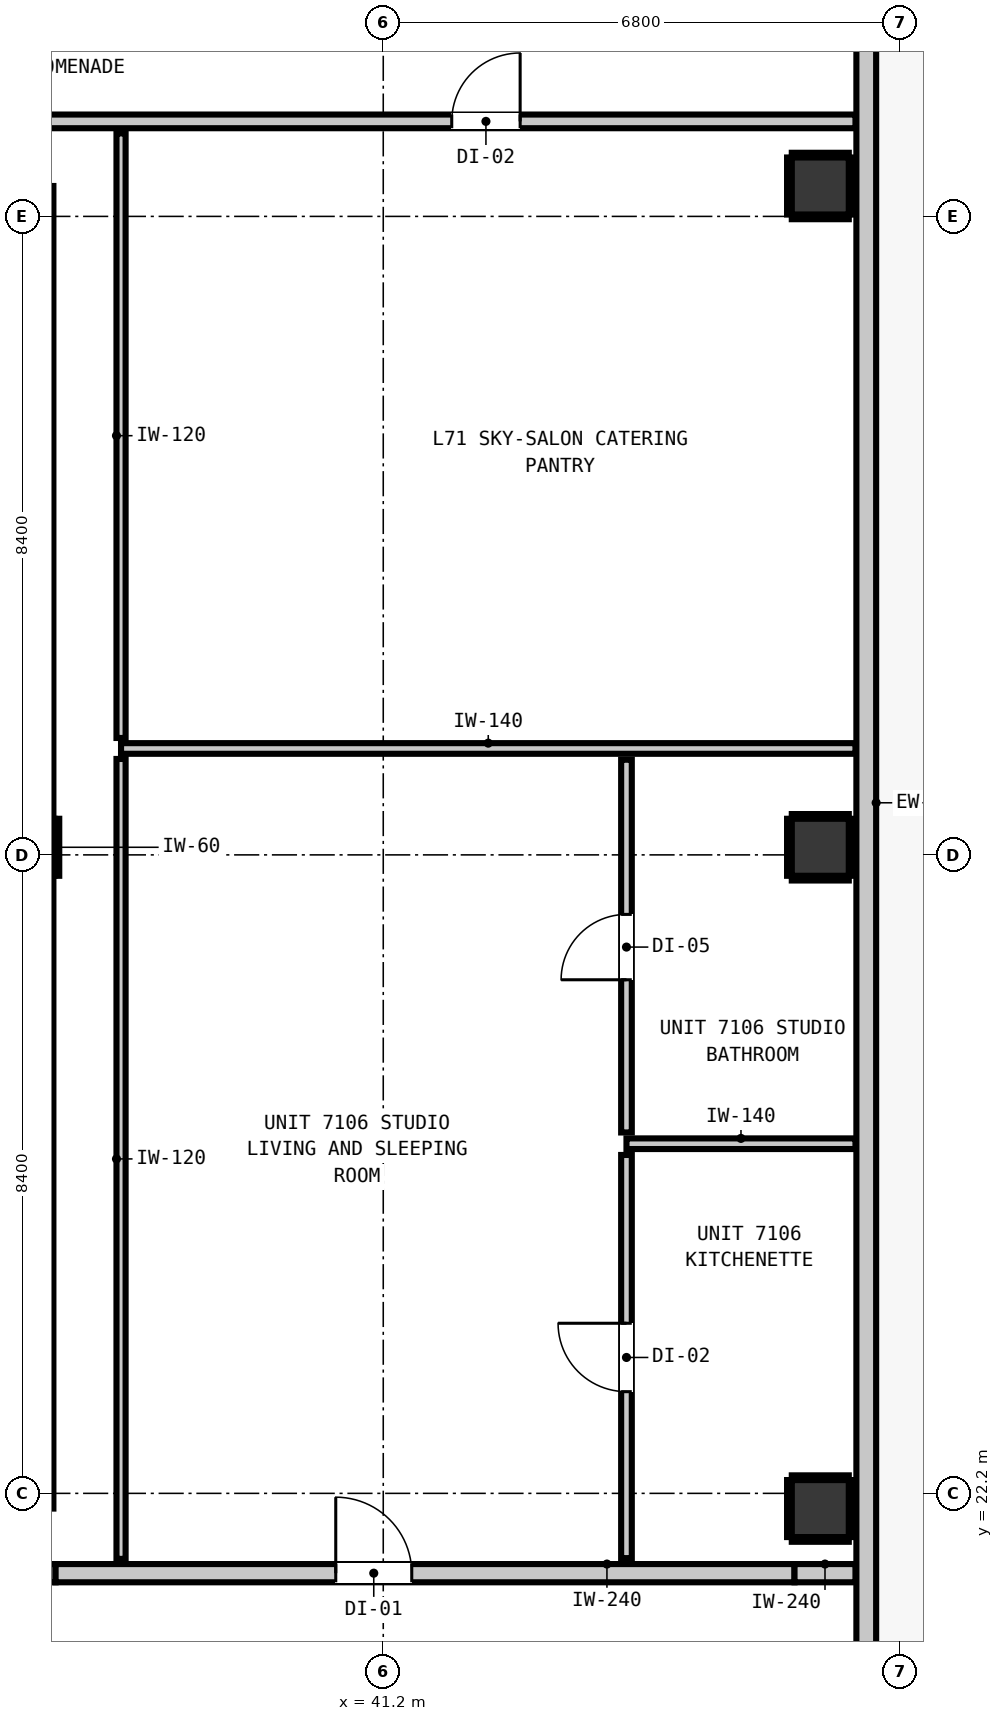
"""IFC4 building model, lengths in metres.
Left out: names, types, materials, properties, quantities, classifications, styles, units other than length and angle.
Written with IfcOpenShell. Run it as: python <this file> out.ifc"""

import sys

from ifc_helpers import new_model, si_unit, direction, frame, frame_2d, origin, origin_2d, place, context, subcontext, project, spatial, rectangle, extrude, element, fill, save


model = new_model("IFC4")
c1 = context("Model", 3, precision=1e-05, world=origin(), true_north=direction((0.0, 1.0)))
c2 = subcontext(c1, "Body", "Model", "MODEL_VIEW")
j1 = project(units=[si_unit("LENGTHUNIT", "METRE"), si_unit("PLANEANGLEUNIT", "RADIAN")], contexts=[c1])
p1 = place(None, origin())
s1 = spatial("IfcSite", under=j1, at=p1, CompositionType="ELEMENT")
p2 = place(p1, origin())
s2 = spatial("IfcBuilding", under=s1, at=p2, CompositionType="ELEMENT")
p3 = place(p2, frame((0.0, 0.0, 244.56)))
s3 = spatial("IfcBuildingStorey", under=s2, at=p3, CompositionType="ELEMENT", Elevation=244.56)
p4 = place(p3, frame((36.5, 30.7, 0.0), z_axis=(0.0, 0.0, 1.0), x_axis=(1.0, 0.0, 0.0)))
e1 = element("IfcColumn", 1, at=p4, inside=s3, PredefinedType="COLUMN", context=c2, shape_type="SweptSolid", body=[
    extrude(rectangle(XDim=0.75, YDim=0.75, at=origin_2d()), origin(), (0.0, 0.0, 1.0), 3.32),
])
p5 = place(p3, frame((36.46, 22.0, 0.0), z_axis=(0.0, 0.0, 1.0), x_axis=(0.0, 1.0, 0.0)))
e2 = element("IfcWall", 2, at=p5, inside=s3, PredefinedType="SHEAR", context=c2, shape_type="SweptSolid", body=[
    extrude(rectangle(XDim=8.32, YDim=0.8, at=frame_2d((4.16, 0.0))), origin(), (0.0, 0.0, 1.0), 3.32),
])
p6 = place(p3, frame((36.46, 31.08, 0.0), z_axis=(0.0, 0.0, 1.0), x_axis=(0.0, 1.0, 0.0)))
e3 = element("IfcWall", 3, at=p6, inside=s3, PredefinedType="SHEAR", context=c2, shape_type="SweptSolid", body=[
    extrude(rectangle(XDim=8.32, YDim=0.8, at=frame_2d((4.16, 0.0))), origin(), (0.0, 0.0, 1.0), 3.32),
])
for number, where, z_axis, x_axis in (
    (4, (46.95, 22.0, 0.0), (0.0, 0.0, 1.0), (1.0, 0.0, 0.0)),
    (5, (46.95, 30.7, 0.0), (0.0, 0.0, 1.0), (1.0, 0.0, 0.0)),
    (6, (46.95, 39.4, 0.0), (0.0, 0.0, 1.0), (1.0, 0.0, 0.0)),
):
    element("IfcColumn", number, at=place(p3, frame(where, z_axis=z_axis, x_axis=x_axis)), inside=s3, PredefinedType="COLUMN", context=c2, shape_type="SweptSolid", body=[
        extrude(rectangle(XDim=0.75, YDim=0.75, at=origin_2d()), origin(), (0.0, 0.0, 1.0), 3.32),
    ])
p7 = place(p3, frame((47.555, 48.855, 0.0), z_axis=(0.0, 0.0, 1.0), x_axis=(0.0, -1.0, 0.0)))
e7 = element("IfcWall", 7, at=p7, inside=s3, PredefinedType="STANDARD", context=c2, shape_type="SweptSolid", body=[
    extrude(rectangle(XDim=30.31, YDim=0.26, at=frame_2d((15.155, 0.0))), origin(), (0.0, 0.0, 1.0), 3.1),
])
p8 = place(p7, frame((3.729, 0.0, 0.0)))
e8 = element("IfcOpeningElement", 8, at=p8, cuts=e7, PredefinedType="OPENING", context=c2, shape_type="SweptSolid", body=[
    extrude(rectangle(XDim=1.0, YDim=2.15, at=frame_2d((0.5, 1.075))), frame((0.0, 0.14, 0.0), z_axis=(0.0, -1.0, 0.0), x_axis=(1.0, 0.0, 0.0)), (0.0, 0.0, 1.0), 0.28),
])
p9 = place(p3, frame((10.787, 21.15, 0.0), z_axis=(0.0, 0.0, 1.0), x_axis=(1.0, 0.0, 0.0)))
e9 = element("IfcWall", 9, at=p9, inside=s3, PredefinedType="PARTITIONING", context=c2, shape_type="SweptSolid", body=[
    extrude(rectangle(XDim=26.102, YDim=0.24, at=frame_2d((13.051, 0.0))), origin(), (0.0, 0.0, 1.0), 3.1),
])
p10 = place(p9, frame((7.423, 0.0, 0.0)))
e10 = element("IfcOpeningElement", 10, at=p10, cuts=e9, PredefinedType="OPENING", context=c2, shape_type="SweptSolid", body=[
    extrude(rectangle(XDim=1.1, YDim=2.15, at=frame_2d((0.55, 1.075))), frame((0.0, 0.13, 0.0), z_axis=(0.0, -1.0, 0.0), x_axis=(1.0, 0.0, 0.0)), (0.0, 0.0, 1.0), 0.26),
])
p11 = place(p3, frame((36.889, 21.15, 0.0), z_axis=(0.0, 0.0, 1.0), x_axis=(1.0, 0.0, 0.0)))
e11 = element("IfcWall", 11, at=p11, inside=s3, PredefinedType="PARTITIONING", context=c2, shape_type="SweptSolid", body=[
    extrude(rectangle(XDim=9.722, YDim=0.24, at=frame_2d((4.861, 0.0))), origin(), (0.0, 0.0, 1.0), 2.477),
])
p12 = place(p11, frame((3.686, 0.0, 0.0)))
e12 = element("IfcOpeningElement", 12, at=p12, cuts=e11, PredefinedType="OPENING", context=c2, shape_type="SweptSolid", body=[
    extrude(rectangle(XDim=1.0, YDim=2.15, at=frame_2d((0.5, 1.075))), frame((0.0, 0.13, 0.0), z_axis=(0.0, -1.0, 0.0), x_axis=(1.0, 0.0, 0.0)), (0.0, 0.0, 1.0), 0.26),
])
p13 = place(p3, frame((46.611, 21.15, 0.0), z_axis=(0.0, 0.0, 1.0), x_axis=(1.0, 0.0, 0.0)))
e13 = element("IfcWall", 13, at=p13, inside=s3, PredefinedType="PARTITIONING", context=c2, shape_type="SweptSolid", body=[
    extrude(rectangle(XDim=0.802, YDim=0.24, at=frame_2d((0.401, 0.0))), origin(), (0.0, 0.0, 1.0), 3.1),
])
p14 = place(p3, frame((10.787, 40.25, 0.0), z_axis=(0.0, 0.0, 1.0), x_axis=(1.0, 0.0, 0.0)))
e14 = element("IfcWall", 14, at=p14, inside=s3, PredefinedType="PARTITIONING", context=c2, shape_type="SweptSolid", body=[
    extrude(rectangle(XDim=36.626, YDim=0.18, at=frame_2d((18.313, 0.0))), origin(), (0.0, 0.0, 1.0), 3.1),
])
p15 = place(p14, frame((6.648, 0.0, 0.0)))
e15 = element("IfcOpeningElement", 15, at=p15, cuts=e14, PredefinedType="OPENING", context=c2, shape_type="SweptSolid", body=[
    extrude(rectangle(XDim=1.4, YDim=2.15, at=frame_2d((0.7, 1.075))), frame((0.0, 0.1, 0.0), z_axis=(0.0, -1.0, 0.0), x_axis=(1.0, 0.0, 0.0)), (0.0, 0.0, 1.0), 0.2),
])
p16 = place(p14, frame((31.314, 0.0, 0.0)))
e16 = element("IfcOpeningElement", 16, at=p16, cuts=e14, PredefinedType="OPENING", context=c2, shape_type="SweptSolid", body=[
    extrude(rectangle(XDim=0.9, YDim=2.1, at=frame_2d((0.45, 1.05))), frame((0.0, 0.1, 0.0), z_axis=(0.0, -1.0, 0.0), x_axis=(1.0, 0.0, 0.0)), (0.0, 0.0, 1.0), 0.2),
])
p17 = place(p3, frame((44.4, 26.8, 0.0), z_axis=(0.0, 0.0, 1.0), x_axis=(1.0, 0.0, 0.0)))
e17 = element("IfcWall", 17, at=p17, inside=s3, PredefinedType="PARTITIONING", context=c2, shape_type="SweptSolid", body=[
    extrude(rectangle(XDim=3.013, YDim=0.14, at=frame_2d((1.507, 0.0))), origin(), (0.0, 0.0, 1.0), 3.1),
])
p18 = place(p3, frame((37.75, 32.0, 0.0), z_axis=(0.0, 0.0, 1.0), x_axis=(1.0, 0.0, 0.0)))
e18 = element("IfcWall", 18, at=p18, inside=s3, PredefinedType="PARTITIONING", context=c2, shape_type="SweptSolid", body=[
    extrude(rectangle(XDim=9.663, YDim=0.14, at=frame_2d((4.832, 0.0))), origin(), (0.0, 0.0, 1.0), 3.1),
])
p19 = place(p3, frame((44.4, 21.348, 0.0), z_axis=(0.0, 0.0, 1.0), x_axis=(0.0, 1.0, 0.0)))
e19 = element("IfcWall", 19, at=p19, inside=s3, PredefinedType="PARTITIONING", context=c2, shape_type="SweptSolid", body=[
    extrude(rectangle(XDim=5.304, YDim=0.14, at=frame_2d((2.652, 0.0))), origin(), (0.0, 0.0, 1.0), 3.1),
])
p20 = place(p19, frame((2.19, 0.0, 0.0)))
e20 = element("IfcOpeningElement", 20, at=p20, cuts=e19, PredefinedType="OPENING", context=c2, shape_type="SweptSolid", body=[
    extrude(rectangle(XDim=0.9, YDim=2.1, at=frame_2d((0.45, 1.05))), frame((0.0, 0.08, 0.0), z_axis=(0.0, -1.0, 0.0), x_axis=(1.0, 0.0, 0.0)), (0.0, 0.0, 1.0), 0.16),
])
p21 = place(p3, frame((44.4, 26.948, 0.0), z_axis=(0.0, 0.0, 1.0), x_axis=(0.0, 1.0, 0.0)))
e21 = element("IfcWall", 21, at=p21, inside=s3, PredefinedType="PARTITIONING", context=c2, shape_type="SweptSolid", body=[
    extrude(rectangle(XDim=4.904, YDim=0.14, at=frame_2d((2.452, 0.0))), origin(), (0.0, 0.0, 1.0), 3.1),
])
p22 = place(p21, frame((2.009, 0.0, 0.0)))
e22 = element("IfcOpeningElement", 22, at=p22, cuts=e21, PredefinedType="OPENING", context=c2, shape_type="SweptSolid", body=[
    extrude(rectangle(XDim=0.86, YDim=2.02, at=frame_2d((0.43, 1.01))), frame((0.0, 0.08, 0.0), z_axis=(0.0, -1.0, 0.0), x_axis=(1.0, 0.0, 0.0)), (0.0, 0.0, 1.0), 0.16),
])
p23 = place(p3, frame((37.75, 21.338, 0.0), z_axis=(0.0, 0.0, 1.0), x_axis=(0.0, 1.0, 0.0)))
e23 = element("IfcWall", 23, at=p23, inside=s3, PredefinedType="PARTITIONING", context=c2, shape_type="SweptSolid", body=[
    extrude(rectangle(XDim=10.524, YDim=0.12, at=frame_2d((5.262, 0.0))), origin(), (0.0, 0.0, 1.0), 3.1),
])
p24 = place(p3, frame((37.75, 32.138, 0.0), z_axis=(0.0, 0.0, 1.0), x_axis=(0.0, 1.0, 0.0)))
e24 = element("IfcWall", 24, at=p24, inside=s3, PredefinedType="PARTITIONING", context=c2, shape_type="SweptSolid", body=[
    extrude(rectangle(XDim=7.954, YDim=0.12, at=frame_2d((3.977, 0.0))), origin(), (0.0, 0.0, 1.0), 3.1),
])
for number, where, z_axis, x_axis in (
    (25, (36.907, 30.325, 0.0), (0.0, 0.0, 1.0), (0.0, 1.0, 0.0)),
    (26, (46.575, 21.593, 0.0), (0.0, 0.0, 1.0), (1.0, 0.0, 0.0)),
    (27, (46.575, 22.407, 0.0), (0.0, 0.0, 1.0), (1.0, 0.0, 0.0)),
    (28, (46.543, 21.625, 0.0), (0.0, 0.0, 1.0), (0.0, 1.0, 0.0)),
    (29, (47.357, 21.625, 0.0), (0.0, 0.0, 1.0), (0.0, 1.0, 0.0)),
    (30, (46.575, 30.293, 0.0), (0.0, 0.0, 1.0), (1.0, 0.0, 0.0)),
    (31, (46.575, 31.107, 0.0), (0.0, 0.0, 1.0), (1.0, 0.0, 0.0)),
    (32, (46.543, 30.325, 0.0), (0.0, 0.0, 1.0), (0.0, 1.0, 0.0)),
    (33, (47.357, 30.325, 0.0), (0.0, 0.0, 1.0), (0.0, 1.0, 0.0)),
    (34, (46.575, 38.993, 0.0), (0.0, 0.0, 1.0), (1.0, 0.0, 0.0)),
    (35, (46.575, 39.807, 0.0), (0.0, 0.0, 1.0), (1.0, 0.0, 0.0)),
    (36, (46.543, 39.025, 0.0), (0.0, 0.0, 1.0), (0.0, 1.0, 0.0)),
    (37, (47.357, 39.025, 0.0), (0.0, 0.0, 1.0), (0.0, 1.0, 0.0)),
):
    element("IfcWall", number, at=place(p3, frame(where, z_axis=z_axis, x_axis=x_axis)), inside=s3, PredefinedType="PARTITIONING", context=c2, shape_type="SweptSolid", body=[
        extrude(rectangle(XDim=0.75, YDim=0.06, at=frame_2d((0.375, 0.0))), origin(), (0.0, 0.0, 1.0), 1.45),
    ])
p25 = place(p12, origin())
e38 = element("IfcDoor", 38, at=p25, inside=s3, OperationType="SINGLE_SWING_LEFT", PredefinedType="DOOR", context=c2, shape_type="SweptSolid", body=[
    extrude(rectangle(XDim=1.0, YDim=2.15, at=frame_2d((0.5, 1.075))), frame((0.0, 0.025, 0.0), z_axis=(0.0, -1.0, 0.0), x_axis=(1.0, 0.0, 0.0)), (0.0, 0.0, 1.0), 0.05),
])
fill(e12, e38)
p26 = place(p20, origin())
e39 = element("IfcDoor", 39, at=p26, inside=s3, OperationType="SINGLE_SWING_RIGHT", PredefinedType="DOOR", context=c2, shape_type="SweptSolid", body=[
    extrude(rectangle(XDim=0.9, YDim=2.1, at=frame_2d((0.45, 1.05))), frame((0.0, 0.025, 0.0), z_axis=(0.0, -1.0, 0.0), x_axis=(1.0, 0.0, 0.0)), (0.0, 0.0, 1.0), 0.05),
])
fill(e20, e39)
p27 = place(p22, origin())
e40 = element("IfcDoor", 40, at=p27, inside=s3, OperationType="SINGLE_SWING_LEFT", PredefinedType="DOOR", context=c2, shape_type="SweptSolid", body=[
    extrude(rectangle(XDim=0.86, YDim=2.02, at=frame_2d((0.43, 1.01))), frame((0.0, 0.025, 0.0), z_axis=(0.0, -1.0, 0.0), x_axis=(1.0, 0.0, 0.0)), (0.0, 0.0, 1.0), 0.05),
])
fill(e22, e40)
p28 = place(p16, origin())
e41 = element("IfcDoor", 41, at=p28, inside=s3, OperationType="SINGLE_SWING_RIGHT", PredefinedType="DOOR", context=c2, shape_type="SweptSolid", body=[
    extrude(rectangle(XDim=0.9, YDim=2.1, at=frame_2d((0.45, 1.05))), frame((0.0, 0.025, 0.0), z_axis=(0.0, -1.0, 0.0), x_axis=(1.0, 0.0, 0.0)), (0.0, 0.0, 1.0), 0.05),
])
fill(e16, e41)
save(model, sys.argv[1])
